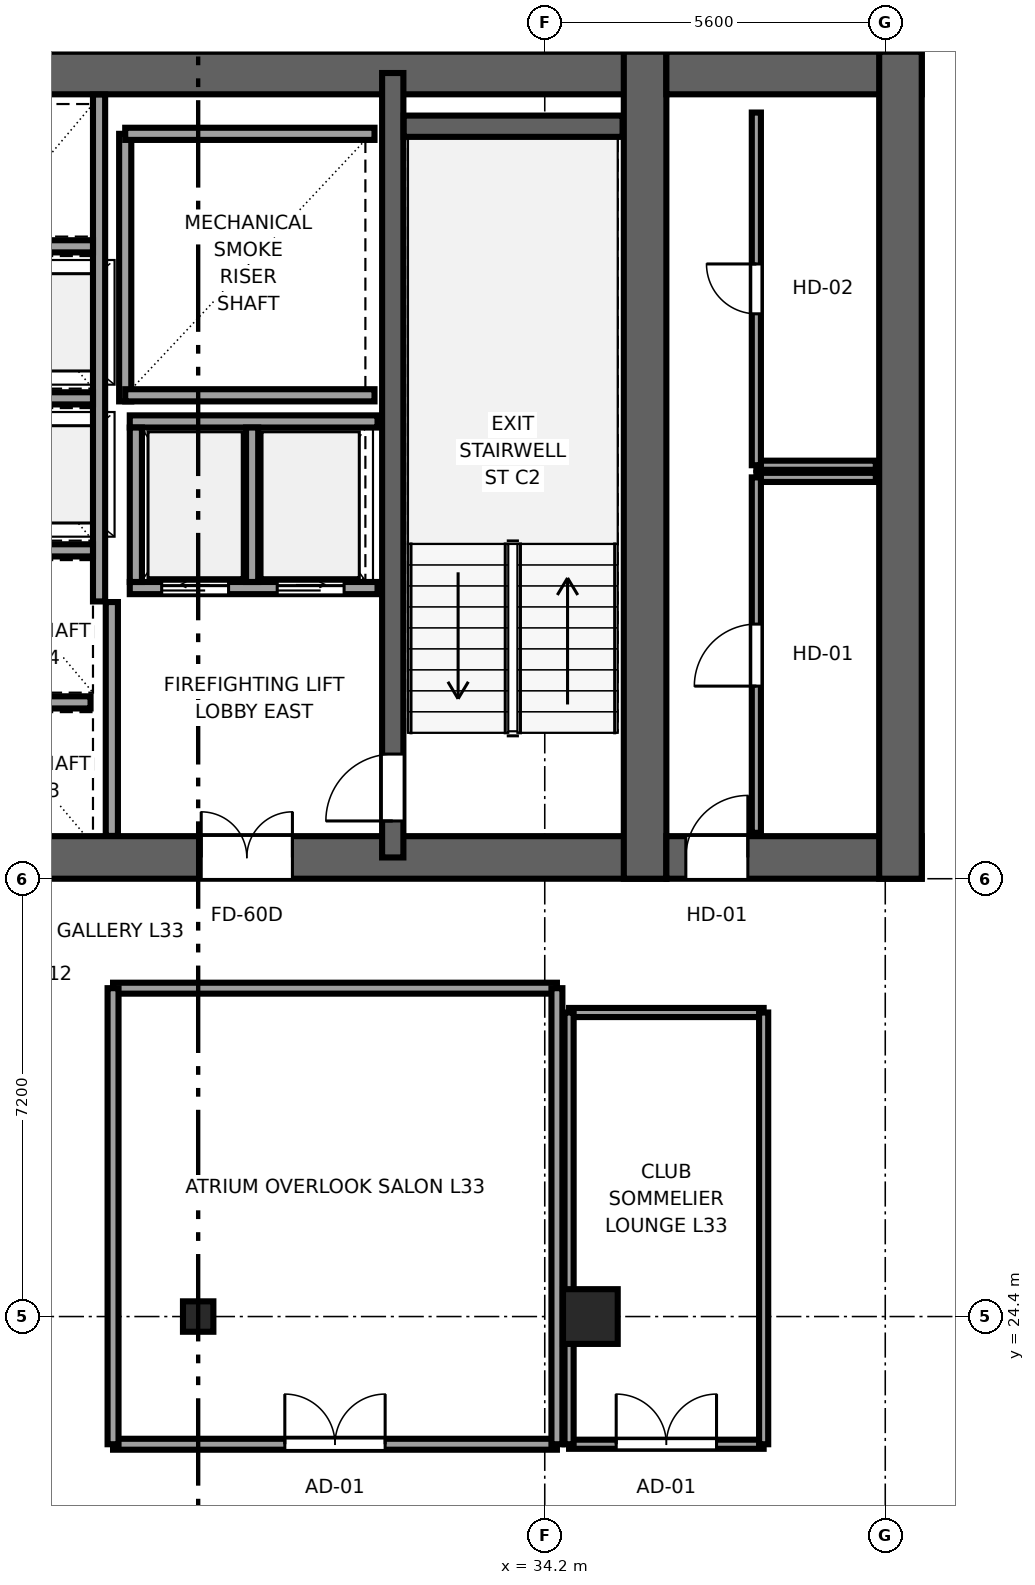
"""IFC4 building model, lengths in metres.
Left out: names, types, materials, properties, quantities, classifications, styles, units other than length and angle.
Written with IfcOpenShell. Run it as: python <this file> out.ifc"""

import sys

from ifc_helpers import new_model, si_unit, direction, frame, frame_2d, origin, origin_2d, place, context, subcontext, project, spatial, rectangle, i_section, extrude, source, transform, mapped, element, fill, save


model = new_model("IFC4")
c1 = context("Model", 3, precision=1e-05, world=origin(), true_north=direction((0.0, 1.0)))
c2 = subcontext(c1, "Body", "Model", "MODEL_VIEW")
j1 = project(units=[si_unit("LENGTHUNIT", "METRE"), si_unit("PLANEANGLEUNIT", "RADIAN")], contexts=[c1])
p1 = place(None, origin())
s1 = spatial("IfcSite", under=j1, at=p1, CompositionType="ELEMENT")
p2 = place(p1, origin())
s2 = spatial("IfcBuilding", under=s1, at=p2, CompositionType="ELEMENT")
p3 = place(p2, frame((0.0, 0.0, 129.3)))
s3 = spatial("IfcBuildingStorey", under=s2, at=p3, CompositionType="ELEMENT", Elevation=129.3)
p4 = place(p3, frame((9.8, 31.95, 0.0), z_axis=(0.0, 0.0, 1.0), x_axis=(1.0, 0.0, 0.0)))
e1 = element("IfcWall", 1, at=p4, inside=s3, PredefinedType="SHEAR", context=c2, shape_type="SweptSolid", body=[
    extrude(rectangle(XDim=26.4, YDim=0.7, at=frame_2d((13.2, 0.0))), origin(), (0.0, 0.0, 1.0), 3.55),
])
p5 = place(p4, frame((7.65, 0.0, 0.0), z_axis=(0.0, 0.0, 1.0), x_axis=(-1.0, 0.0, 0.0)))
e2 = element("IfcOpeningElement", 2, at=p5, cuts=e1, PredefinedType="OPENING", context=c2, shape_type="SweptSolid", body=[
    extrude(rectangle(XDim=1.5, YDim=2.04, at=frame_2d((0.75, 1.02))), frame((0.0, 0.36, 0.0), z_axis=(0.0, -1.0, 0.0), x_axis=(1.0, 0.0, 0.0)), (0.0, 0.0, 1.0), 0.72),
])
p6 = place(p4, frame((13.95, 0.0, 0.0), z_axis=(0.0, 0.0, 1.0), x_axis=(-1.0, 0.0, 0.0)))
e3 = element("IfcOpeningElement", 3, at=p6, cuts=e1, PredefinedType="OPENING", context=c2, shape_type="SweptSolid", body=[
    extrude(rectangle(XDim=1.5, YDim=2.04, at=frame_2d((0.75, 1.02))), frame((0.0, 0.36, 0.0), z_axis=(0.0, -1.0, 0.0), x_axis=(1.0, 0.0, 0.0)), (0.0, 0.0, 1.0), 0.72),
])
p7 = place(p4, frame((20.25, 0.0, 0.0), z_axis=(0.0, 0.0, 1.0), x_axis=(-1.0, 0.0, 0.0)))
e4 = element("IfcOpeningElement", 4, at=p7, cuts=e1, PredefinedType="OPENING", context=c2, shape_type="SweptSolid", body=[
    extrude(rectangle(XDim=1.5, YDim=2.04, at=frame_2d((0.75, 1.02))), frame((0.0, 0.36, 0.0), z_axis=(0.0, -1.0, 0.0), x_axis=(1.0, 0.0, 0.0)), (0.0, 0.0, 1.0), 0.72),
])
p8 = place(p3, frame((9.8, 44.85, 0.0), z_axis=(0.0, 0.0, 1.0), x_axis=(1.0, 0.0, 0.0)))
e5 = element("IfcWall", 5, at=p8, inside=s3, PredefinedType="SHEAR", context=c2, shape_type="SweptSolid", body=[
    extrude(rectangle(XDim=26.4, YDim=0.7, at=frame_2d((13.2, 0.0))), origin(), (0.0, 0.0, 1.0), 3.55),
])
p9 = place(p3, frame((35.85, 31.6, 0.0), z_axis=(0.0, 0.0, 1.0), x_axis=(0.0, 1.0, 0.0)))
e6 = element("IfcWall", 6, at=p9, inside=s3, PredefinedType="SHEAR", context=c2, shape_type="SweptSolid", body=[
    extrude(rectangle(XDim=13.6, YDim=0.7, at=frame_2d((6.8, 0.0))), origin(), (0.0, 0.0, 1.0), 3.55),
])
p10 = place(p3, frame((31.7, 31.95, 0.0), z_axis=(0.0, 0.0, 1.0), x_axis=(0.0, 1.0, 0.0)))
e7 = element("IfcWall", 7, at=p10, inside=s3, PredefinedType="SHEAR", context=c2, shape_type="SweptSolid", body=[
    extrude(rectangle(XDim=12.9, YDim=0.35, at=frame_2d((6.45, 0.0))), origin(), (0.0, 0.0, 1.0), 3.55),
])
p11 = place(p10, frame((1.7, 0.0, 0.0), z_axis=(0.0, 0.0, 1.0), x_axis=(-1.0, 0.0, 0.0)))
e8 = element("IfcOpeningElement", 8, at=p11, cuts=e7, PredefinedType="OPENING", context=c2, shape_type="SweptSolid", body=[
    extrude(rectangle(XDim=1.1, YDim=2.12, at=frame_2d((0.55, 1.06))), frame((0.0, 0.185, 0.0), z_axis=(0.0, -1.0, 0.0), x_axis=(1.0, 0.0, 0.0)), (0.0, 0.0, 1.0), 0.37),
])
p12 = place(p3, frame((36.2, 31.95, 0.0), z_axis=(0.0, 0.0, 1.0), x_axis=(1.0, 0.0, 0.0)))
e9 = element("IfcWall", 9, at=p12, inside=s3, PredefinedType="SHEAR", context=c2, shape_type="SweptSolid", body=[
    extrude(rectangle(XDim=4.2, YDim=0.7, at=frame_2d((2.1, 0.0))), origin(), (0.0, 0.0, 1.0), 3.55),
])
p13 = place(p12, frame((1.34, 0.0, 0.0), z_axis=(0.0, 0.0, 1.0), x_axis=(-1.0, 0.0, 0.0)))
e10 = element("IfcOpeningElement", 10, at=p13, cuts=e9, PredefinedType="OPENING", context=c2, shape_type="SweptSolid", body=[
    extrude(rectangle(XDim=1.02, YDim=2.03, at=frame_2d((0.51, 1.015))), frame((0.0, 0.36, 0.0), z_axis=(0.0, -1.0, 0.0), x_axis=(1.0, 0.0, 0.0)), (0.0, 0.0, 1.0), 0.72),
])
p14 = place(p3, frame((36.2, 44.85, 0.0), z_axis=(0.0, 0.0, 1.0), x_axis=(1.0, 0.0, 0.0)))
e11 = element("IfcWall", 11, at=p14, inside=s3, PredefinedType="SHEAR", context=c2, shape_type="SweptSolid", body=[
    extrude(rectangle(XDim=4.2, YDim=0.7, at=frame_2d((2.1, 0.0))), origin(), (0.0, 0.0, 1.0), 3.55),
])
p15 = place(p3, frame((40.05, 31.6, 0.0), z_axis=(0.0, 0.0, 1.0), x_axis=(0.0, 1.0, 0.0)))
e12 = element("IfcWall", 12, at=p15, inside=s3, PredefinedType="SHEAR", context=c2, shape_type="SweptSolid", body=[
    extrude(rectangle(XDim=13.6, YDim=0.7, at=frame_2d((6.8, 0.0))), origin(), (0.0, 0.0, 1.0), 3.55),
])
p16 = place(p3, frame((31.88, 43.975, 0.0), z_axis=(0.0, 0.0, 1.0), x_axis=(1.0, 0.0, 0.0)))
e13 = element("IfcWall", 13, at=p16, inside=s3, PredefinedType="SHEAR", context=c2, shape_type="SweptSolid", body=[
    extrude(rectangle(XDim=3.6, YDim=0.35, at=frame_2d((1.8, 0.0))), origin(), (0.0, 0.0, 1.0), 3.55),
])
m1 = source(origin(), c2, "Body", "SweptSolid", [
    extrude(rectangle(XDim=0.9, YDim=0.9, at=origin_2d()), origin(), (0.0, 0.0, 1.0), 3.55),
])
p17 = place(p3, frame((34.95, 24.4, 0.0), z_axis=(0.0, 0.0, 1.0), x_axis=(1.0, 0.0, 0.0)))
e14 = element("IfcColumn", 14, at=p17, inside=s3, PredefinedType="COLUMN", context=c2, shape_type="MappedRepresentation", body=[
    mapped(m1, transform((0.0, 0.0, 0.0), x_axis=(1.0, 0.0, 0.0), y_axis=(0.0, 1.0, 0.0), z_axis=(0.0, 0.0, 1.0), scale=1.0)),
])
m2 = source(origin(), c2, "Body", "SweptSolid", [
    extrude(i_section(OverallWidth=0.5, OverallDepth=0.5, WebThickness=0.022, FlangeThickness=0.034, at=origin_2d()), origin(), (0.0, 0.0, 1.0), 3.55),
])
p18 = place(p3, frame((28.5, 24.4, 0.0), z_axis=(0.0, 0.0, 1.0), x_axis=(1.0, 0.0, 0.0)))
e15 = element("IfcColumn", 15, at=p18, inside=s3, PredefinedType="COLUMN", context=c2, shape_type="MappedRepresentation", body=[
    mapped(m2, transform((0.0, 0.0, 0.0), x_axis=(1.0, 0.0, 0.0), y_axis=(0.0, 1.0, 0.0), z_axis=(0.0, 0.0, 1.0), scale=1.0)),
])
p19 = place(p3, frame((27.3, 39.45, 0.0), z_axis=(0.0, 0.0, 1.0), x_axis=(0.0, 1.0, 0.0)))
e16 = element("IfcWall", 16, at=p19, inside=s3, PredefinedType="SOLIDWALL", context=c2, shape_type="SweptSolid", body=[
    extrude(rectangle(XDim=4.4, YDim=0.2, at=frame_2d((2.2, 0.0))), origin(), (0.0, 0.0, 1.0), 3.37),
])
for number, where, z_axis, x_axis in (
    (17, (27.3, 39.55, 0.0), (0.0, 0.0, 1.0), (1.0, 0.0, 0.0)),
    (18, (27.3, 43.85, 0.0), (0.0, 0.0, 1.0), (1.0, 0.0, 0.0)),
):
    element("IfcWall", number, at=place(p3, frame(where, z_axis=z_axis, x_axis=x_axis)), inside=s3, PredefinedType="SOLIDWALL", context=c2, shape_type="SweptSolid", body=[
        extrude(rectangle(XDim=4.1, YDim=0.2, at=frame_2d((2.05, 0.0))), origin(), (0.0, 0.0, 1.0), 3.37),
    ])
p20 = place(p3, frame((27.08, 32.304, 0.0), z_axis=(0.0, 0.0, 1.0), x_axis=(0.0, 1.0, 0.0)))
e19 = element("IfcWall", 19, at=p20, inside=s3, PredefinedType="SOLIDWALL", context=c2, shape_type="SweptSolid", body=[
    extrude(rectangle(XDim=3.846, YDim=0.2, at=frame_2d((1.923, 0.0))), origin(), (0.0, 0.0, 1.0), 3.37),
])
p21 = place(p3, frame((27.375, 36.38, 0.0), z_axis=(0.0, 0.0, 1.0), x_axis=(1.0, 0.0, 0.0)))
e20 = element("IfcWall", 20, at=p21, inside=s3, PredefinedType="SOLIDWALL", context=c2, shape_type="SweptSolid", body=[
    extrude(rectangle(XDim=4.075, YDim=0.2, at=frame_2d((2.038, 0.0))), origin(), (0.0, 0.0, 1.0), 3.37),
])
p22 = place(p21, frame((0.525, 0.0, 0.0)))
e21 = element("IfcOpeningElement", 21, at=p22, cuts=e20, PredefinedType="OPENING", context=c2, shape_type="SweptSolid", body=[
    extrude(rectangle(XDim=1.1, YDim=2.12, at=frame_2d((0.55, 1.06))), frame((0.0, 0.11, 0.0), z_axis=(0.0, -1.0, 0.0), x_axis=(1.0, 0.0, 0.0)), (0.0, 0.0, 1.0), 0.22),
])
p23 = place(p21, frame((2.425, 0.0, 0.0)))
e22 = element("IfcOpeningElement", 22, at=p23, cuts=e20, PredefinedType="OPENING", context=c2, shape_type="SweptSolid", body=[
    extrude(rectangle(XDim=1.1, YDim=2.12, at=frame_2d((0.55, 1.06))), frame((0.0, 0.11, 0.0), z_axis=(0.0, -1.0, 0.0), x_axis=(1.0, 0.0, 0.0)), (0.0, 0.0, 1.0), 0.22),
])
p24 = place(p3, frame((27.375, 39.12, 0.0), z_axis=(0.0, 0.0, 1.0), x_axis=(1.0, 0.0, 0.0)))
e23 = element("IfcWall", 23, at=p24, inside=s3, PredefinedType="SOLIDWALL", context=c2, shape_type="SweptSolid", body=[
    extrude(rectangle(XDim=4.075, YDim=0.2, at=frame_2d((2.038, 0.0))), origin(), (0.0, 0.0, 1.0), 3.37),
])
for number, where, z_axis, x_axis in (
    (24, (27.475, 36.48, 0.0), (0.0, 0.0, 1.0), (0.0, 1.0, 0.0)),
    (25, (29.387, 36.48, 0.0), (0.0, 0.0, 1.0), (0.0, 1.0, 0.0)),
):
    element("IfcWall", number, at=place(p3, frame(where, z_axis=z_axis, x_axis=x_axis)), inside=s3, PredefinedType="SOLIDWALL", context=c2, shape_type="SweptSolid", body=[
        extrude(rectangle(XDim=2.54, YDim=0.2, at=frame_2d((1.27, 0.0))), origin(), (0.0, 0.0, 1.0), 3.37),
    ])
p25 = place(p3, frame((26.87, 36.16, 0.0), z_axis=(0.0, 0.0, 1.0), x_axis=(0.0, 1.0, 0.0)))
e26 = element("IfcWall", 26, at=p25, inside=s3, PredefinedType="SOLIDWALL", context=c2, shape_type="SweptSolid", body=[
    extrude(rectangle(XDim=8.336, YDim=0.2, at=frame_2d((4.168, 0.0))), origin(), (0.0, 0.0, 1.0), 3.37),
])
p26 = place(p3, frame((24.93, 34.5, 0.0), z_axis=(0.0, 0.0, 1.0), x_axis=(1.0, 0.0, 0.0)))
e27 = element("IfcWall", 27, at=p26, inside=s3, PredefinedType="SOLIDWALL", context=c2, shape_type="SweptSolid", body=[
    extrude(rectangle(XDim=1.8, YDim=0.2, at=frame_2d((0.9, 0.0))), origin(), (0.0, 0.0, 1.0), 3.37),
])
for number, where, z_axis, x_axis in (
    (28, (24.93, 37.0, 0.0), (0.0, 0.0, 1.0), (1.0, 0.0, 0.0)),
    (29, (24.93, 39.5, 0.0), (0.0, 0.0, 1.0), (1.0, 0.0, 0.0)),
    (30, (24.93, 42.0, 0.0), (0.0, 0.0, 1.0), (1.0, 0.0, 0.0)),
):
    element("IfcWall", number, at=place(p3, frame(where, z_axis=z_axis, x_axis=x_axis)), inside=s3, PredefinedType="SOLIDWALL", context=c2, shape_type="SweptSolid", body=[
        extrude(rectangle(XDim=1.84, YDim=0.2, at=frame_2d((0.92, 0.0))), origin(), (0.0, 0.0, 1.0), 3.37),
    ])
p27 = place(p3, frame((37.68, 38.2, 0.0), z_axis=(0.0, 0.0, 1.0), x_axis=(1.0, 0.0, 0.0)))
e31 = element("IfcWall", 31, at=p27, inside=s3, PredefinedType="PARTITIONING", context=c2, shape_type="SweptSolid", body=[
    extrude(rectangle(XDim=1.965, YDim=0.15, at=frame_2d((0.982, 0.0))), origin(), (0.0, 0.0, 1.0), 3.37),
])
p28 = place(p3, frame((37.68, 32.355, 0.0), z_axis=(0.0, 0.0, 1.0), x_axis=(0.0, 1.0, 0.0)))
e32 = element("IfcWall", 32, at=p28, inside=s3, PredefinedType="PARTITIONING", context=c2, shape_type="SweptSolid", body=[
    extrude(rectangle(XDim=5.845, YDim=0.15, at=frame_2d((2.922, 0.0))), origin(), (0.0, 0.0, 1.0), 3.37),
])
p29 = place(p28, frame((2.413, 0.0, 0.0)))
e33 = element("IfcOpeningElement", 33, at=p29, cuts=e32, PredefinedType="OPENING", context=c2, shape_type="SweptSolid", body=[
    extrude(rectangle(XDim=1.02, YDim=2.03, at=frame_2d((0.51, 1.015))), frame((0.0, 0.085, 0.0), z_axis=(0.0, -1.0, 0.0), x_axis=(1.0, 0.0, 0.0)), (0.0, 0.0, 1.0), 0.17),
])
p30 = place(p3, frame((37.68, 38.4, 0.0), z_axis=(0.0, 0.0, 1.0), x_axis=(1.0, 0.0, 0.0)))
e34 = element("IfcWall", 34, at=p30, inside=s3, PredefinedType="PARTITIONING", context=c2, shape_type="SweptSolid", body=[
    extrude(rectangle(XDim=1.965, YDim=0.15, at=frame_2d((0.982, 0.0))), origin(), (0.0, 0.0, 1.0), 3.37),
])
p31 = place(p3, frame((37.68, 38.4, 0.0), z_axis=(0.0, 0.0, 1.0), x_axis=(0.0, 1.0, 0.0)))
e35 = element("IfcWall", 35, at=p31, inside=s3, PredefinedType="PARTITIONING", context=c2, shape_type="SweptSolid", body=[
    extrude(rectangle(XDim=5.8, YDim=0.15, at=frame_2d((2.9, 0.0))), origin(), (0.0, 0.0, 1.0), 3.37),
])
p32 = place(p31, frame((2.49, 0.0, 0.0)))
e36 = element("IfcOpeningElement", 36, at=p32, cuts=e35, PredefinedType="OPENING", context=c2, shape_type="SweptSolid", body=[
    extrude(rectangle(XDim=0.82, YDim=2.01, at=frame_2d((0.41, 1.005))), frame((0.0, 0.085, 0.0), z_axis=(0.0, -1.0, 0.0), x_axis=(1.0, 0.0, 0.0)), (0.0, 0.0, 1.0), 0.17),
])
p33 = place(p3, frame((27.1, 22.3, 0.0), z_axis=(0.0, 0.0, 1.0), x_axis=(1.0, 0.0, 0.0)))
e37 = element("IfcWall", 37, at=p33, inside=s3, PredefinedType="PARTITIONING", context=c2, shape_type="SweptSolid", body=[
    extrude(rectangle(XDim=7.3, YDim=0.18, at=frame_2d((3.65, 0.0))), origin(), (0.0, 0.0, 1.0), 3.37),
])
p34 = place(p33, frame((2.825, 0.0, 0.0)))
e38 = element("IfcOpeningElement", 38, at=p34, cuts=e37, PredefinedType="OPENING", context=c2, shape_type="SweptSolid", body=[
    extrude(rectangle(XDim=1.65, YDim=2.15, at=frame_2d((0.825, 1.075))), frame((0.0, 0.1, 0.0), z_axis=(0.0, -1.0, 0.0), x_axis=(1.0, 0.0, 0.0)), (0.0, 0.0, 1.0), 0.2),
])
p35 = place(p3, frame((27.1, 29.8, 0.0), z_axis=(0.0, 0.0, 1.0), x_axis=(1.0, 0.0, 0.0)))
e39 = element("IfcWall", 39, at=p35, inside=s3, PredefinedType="PARTITIONING", context=c2, shape_type="SweptSolid", body=[
    extrude(rectangle(XDim=7.3, YDim=0.18, at=frame_2d((3.65, 0.0))), origin(), (0.0, 0.0, 1.0), 3.37),
])
for number, where, z_axis, x_axis in (
    (40, (27.1, 22.3, 0.0), (0.0, 0.0, 1.0), (0.0, 1.0, 0.0)),
    (41, (34.4, 22.3, 0.0), (0.0, 0.0, 1.0), (0.0, 1.0, 0.0)),
):
    element("IfcWall", number, at=place(p3, frame(where, z_axis=z_axis, x_axis=x_axis)), inside=s3, PredefinedType="PARTITIONING", context=c2, shape_type="SweptSolid", body=[
        extrude(rectangle(XDim=7.5, YDim=0.18, at=frame_2d((3.75, 0.0))), origin(), (0.0, 0.0, 1.0), 3.37),
    ])
p36 = place(p3, frame((34.6, 22.3, 0.0), z_axis=(0.0, 0.0, 1.0), x_axis=(1.0, 0.0, 0.0)))
e42 = element("IfcWall", 42, at=p36, inside=s3, PredefinedType="PARTITIONING", context=c2, shape_type="SweptSolid", body=[
    extrude(rectangle(XDim=3.2, YDim=0.15, at=frame_2d((1.6, 0.0))), origin(), (0.0, 0.0, 1.0), 3.37),
])
p37 = place(p36, frame((0.775, 0.0, 0.0)))
e43 = element("IfcOpeningElement", 43, at=p37, cuts=e42, PredefinedType="OPENING", context=c2, shape_type="SweptSolid", body=[
    extrude(rectangle(XDim=1.65, YDim=2.15, at=frame_2d((0.825, 1.075))), frame((0.0, 0.085, 0.0), z_axis=(0.0, -1.0, 0.0), x_axis=(1.0, 0.0, 0.0)), (0.0, 0.0, 1.0), 0.17),
])
p38 = place(p3, frame((34.6, 29.4, 0.0), z_axis=(0.0, 0.0, 1.0), x_axis=(1.0, 0.0, 0.0)))
e44 = element("IfcWall", 44, at=p38, inside=s3, PredefinedType="PARTITIONING", context=c2, shape_type="SweptSolid", body=[
    extrude(rectangle(XDim=3.2, YDim=0.15, at=frame_2d((1.6, 0.0))), origin(), (0.0, 0.0, 1.0), 3.37),
])
for number, where, z_axis, x_axis in (
    (45, (34.6, 22.3, 0.0), (0.0, 0.0, 1.0), (0.0, 1.0, 0.0)),
    (46, (37.8, 22.3, 0.0), (0.0, 0.0, 1.0), (0.0, 1.0, 0.0)),
):
    element("IfcWall", number, at=place(p3, frame(where, z_axis=z_axis, x_axis=x_axis)), inside=s3, PredefinedType="PARTITIONING", context=c2, shape_type="SweptSolid", body=[
        extrude(rectangle(XDim=7.1, YDim=0.15, at=frame_2d((3.55, 0.0))), origin(), (0.0, 0.0, 1.0), 3.37),
    ])
m3 = source(origin(), c2, "Body", "SweptSolid", [
    extrude(rectangle(XDim=1.1, YDim=2.12, at=frame_2d((0.55, 1.06))), frame((0.0, 0.025, 0.0), z_axis=(0.0, -1.0, 0.0), x_axis=(1.0, 0.0, 0.0)), (0.0, 0.0, 1.0), 0.05),
])
p39 = place(p11, origin())
e47 = element("IfcDoor", 47, at=p39, inside=s3, OperationType="SINGLE_SWING_LEFT", PredefinedType="DOOR", context=c2, shape_type="MappedRepresentation", body=[
    mapped(m3, transform((0.0, 0.0, 0.0), x_axis=(1.0, 0.0, 0.0), y_axis=(0.0, 1.0, 0.0), z_axis=(0.0, 0.0, 1.0), scale=1.0)),
])
fill(e8, e47)
m4 = source(origin(), c2, "Body", "SweptSolid", [
    extrude(rectangle(XDim=1.5, YDim=2.04, at=frame_2d((0.75, 1.02))), frame((0.0, 0.025, 0.0), z_axis=(0.0, -1.0, 0.0), x_axis=(1.0, 0.0, 0.0)), (0.0, 0.0, 1.0), 0.05),
])
p40 = place(p7, origin())
e48 = element("IfcDoor", 48, at=p40, inside=s3, OperationType="DOUBLE_DOOR_SINGLE_SWING", PredefinedType="DOOR", context=c2, shape_type="MappedRepresentation", body=[
    mapped(m4, transform((0.0, 0.0, 0.0), x_axis=(1.0, 0.0, 0.0), y_axis=(0.0, 1.0, 0.0), z_axis=(0.0, 0.0, 1.0), scale=1.0)),
])
fill(e4, e48)
m5 = source(origin(), c2, "Body", "SweptSolid", [
    extrude(rectangle(XDim=1.02, YDim=2.03, at=frame_2d((0.51, 1.015))), frame((0.0, 0.025, 0.0), z_axis=(0.0, -1.0, 0.0), x_axis=(1.0, 0.0, 0.0)), (0.0, 0.0, 1.0), 0.05),
])
p41 = place(p13, origin())
e49 = element("IfcDoor", 49, at=p41, inside=s3, OperationType="SINGLE_SWING_RIGHT", PredefinedType="DOOR", context=c2, shape_type="MappedRepresentation", body=[
    mapped(m5, transform((0.0, 0.0, 0.0), x_axis=(1.0, 0.0, 0.0), y_axis=(0.0, 1.0, 0.0), z_axis=(0.0, 0.0, 1.0), scale=1.0)),
])
fill(e10, e49)
m6 = source(origin(), c2, "Body", "SweptSolid", [
    extrude(rectangle(XDim=1.1, YDim=2.12, at=frame_2d((0.55, 1.06))), frame((0.0, 0.025, 0.0), z_axis=(0.0, -1.0, 0.0), x_axis=(1.0, 0.0, 0.0)), (0.0, 0.0, 1.0), 0.05),
])
p42 = place(p22, origin())
e50 = element("IfcDoor", 50, at=p42, inside=s3, OperationType="SLIDING_TO_LEFT", PredefinedType="DOOR", context=c2, shape_type="MappedRepresentation", body=[
    mapped(m6, transform((0.0, 0.0, 0.0), x_axis=(1.0, 0.0, 0.0), y_axis=(0.0, 1.0, 0.0), z_axis=(0.0, 0.0, 1.0), scale=1.0)),
])
fill(e21, e50)
p43 = place(p23, origin())
e51 = element("IfcDoor", 51, at=p43, inside=s3, OperationType="SLIDING_TO_RIGHT", PredefinedType="DOOR", context=c2, shape_type="MappedRepresentation", body=[
    mapped(m6, transform((0.0, 0.0, 0.0), x_axis=(1.0, 0.0, 0.0), y_axis=(0.0, 1.0, 0.0), z_axis=(0.0, 0.0, 1.0), scale=1.0)),
])
fill(e22, e51)
p44 = place(p29, origin())
e52 = element("IfcDoor", 52, at=p44, inside=s3, OperationType="SINGLE_SWING_LEFT", PredefinedType="DOOR", context=c2, shape_type="MappedRepresentation", body=[
    mapped(m5, transform((0.0, 0.0, 0.0), x_axis=(1.0, 0.0, 0.0), y_axis=(0.0, 1.0, 0.0), z_axis=(0.0, 0.0, 1.0), scale=1.0)),
])
fill(e33, e52)
m7 = source(origin(), c2, "Body", "SweptSolid", [
    extrude(rectangle(XDim=0.82, YDim=2.01, at=frame_2d((0.41, 1.005))), frame((0.0, 0.025, 0.0), z_axis=(0.0, -1.0, 0.0), x_axis=(1.0, 0.0, 0.0)), (0.0, 0.0, 1.0), 0.05),
])
p45 = place(p32, origin())
e53 = element("IfcDoor", 53, at=p45, inside=s3, OperationType="SINGLE_SWING_RIGHT", PredefinedType="DOOR", context=c2, shape_type="MappedRepresentation", body=[
    mapped(m7, transform((0.0, 0.0, 0.0), x_axis=(1.0, 0.0, 0.0), y_axis=(0.0, 1.0, 0.0), z_axis=(0.0, 0.0, 1.0), scale=1.0)),
])
fill(e36, e53)
m8 = source(origin(), c2, "Body", "SweptSolid", [
    extrude(rectangle(XDim=1.65, YDim=2.15, at=frame_2d((0.825, 1.075))), frame((0.0, 0.025, 0.0), z_axis=(0.0, -1.0, 0.0), x_axis=(1.0, 0.0, 0.0)), (0.0, 0.0, 1.0), 0.05),
])
p46 = place(p34, origin())
e54 = element("IfcDoor", 54, at=p46, inside=s3, OperationType="DOUBLE_DOOR_SINGLE_SWING", PredefinedType="DOOR", context=c2, shape_type="MappedRepresentation", body=[
    mapped(m8, transform((0.0, 0.0, 0.0), x_axis=(1.0, 0.0, 0.0), y_axis=(0.0, 1.0, 0.0), z_axis=(0.0, 0.0, 1.0), scale=1.0)),
])
fill(e38, e54)
p47 = place(p37, origin())
e55 = element("IfcDoor", 55, at=p47, inside=s3, OperationType="DOUBLE_DOOR_SINGLE_SWING", PredefinedType="DOOR", context=c2, shape_type="MappedRepresentation", body=[
    mapped(m8, transform((0.0, 0.0, 0.0), x_axis=(1.0, 0.0, 0.0), y_axis=(0.0, 1.0, 0.0), z_axis=(0.0, 0.0, 1.0), scale=1.0)),
])
fill(e43, e55)
save(model, sys.argv[1])
